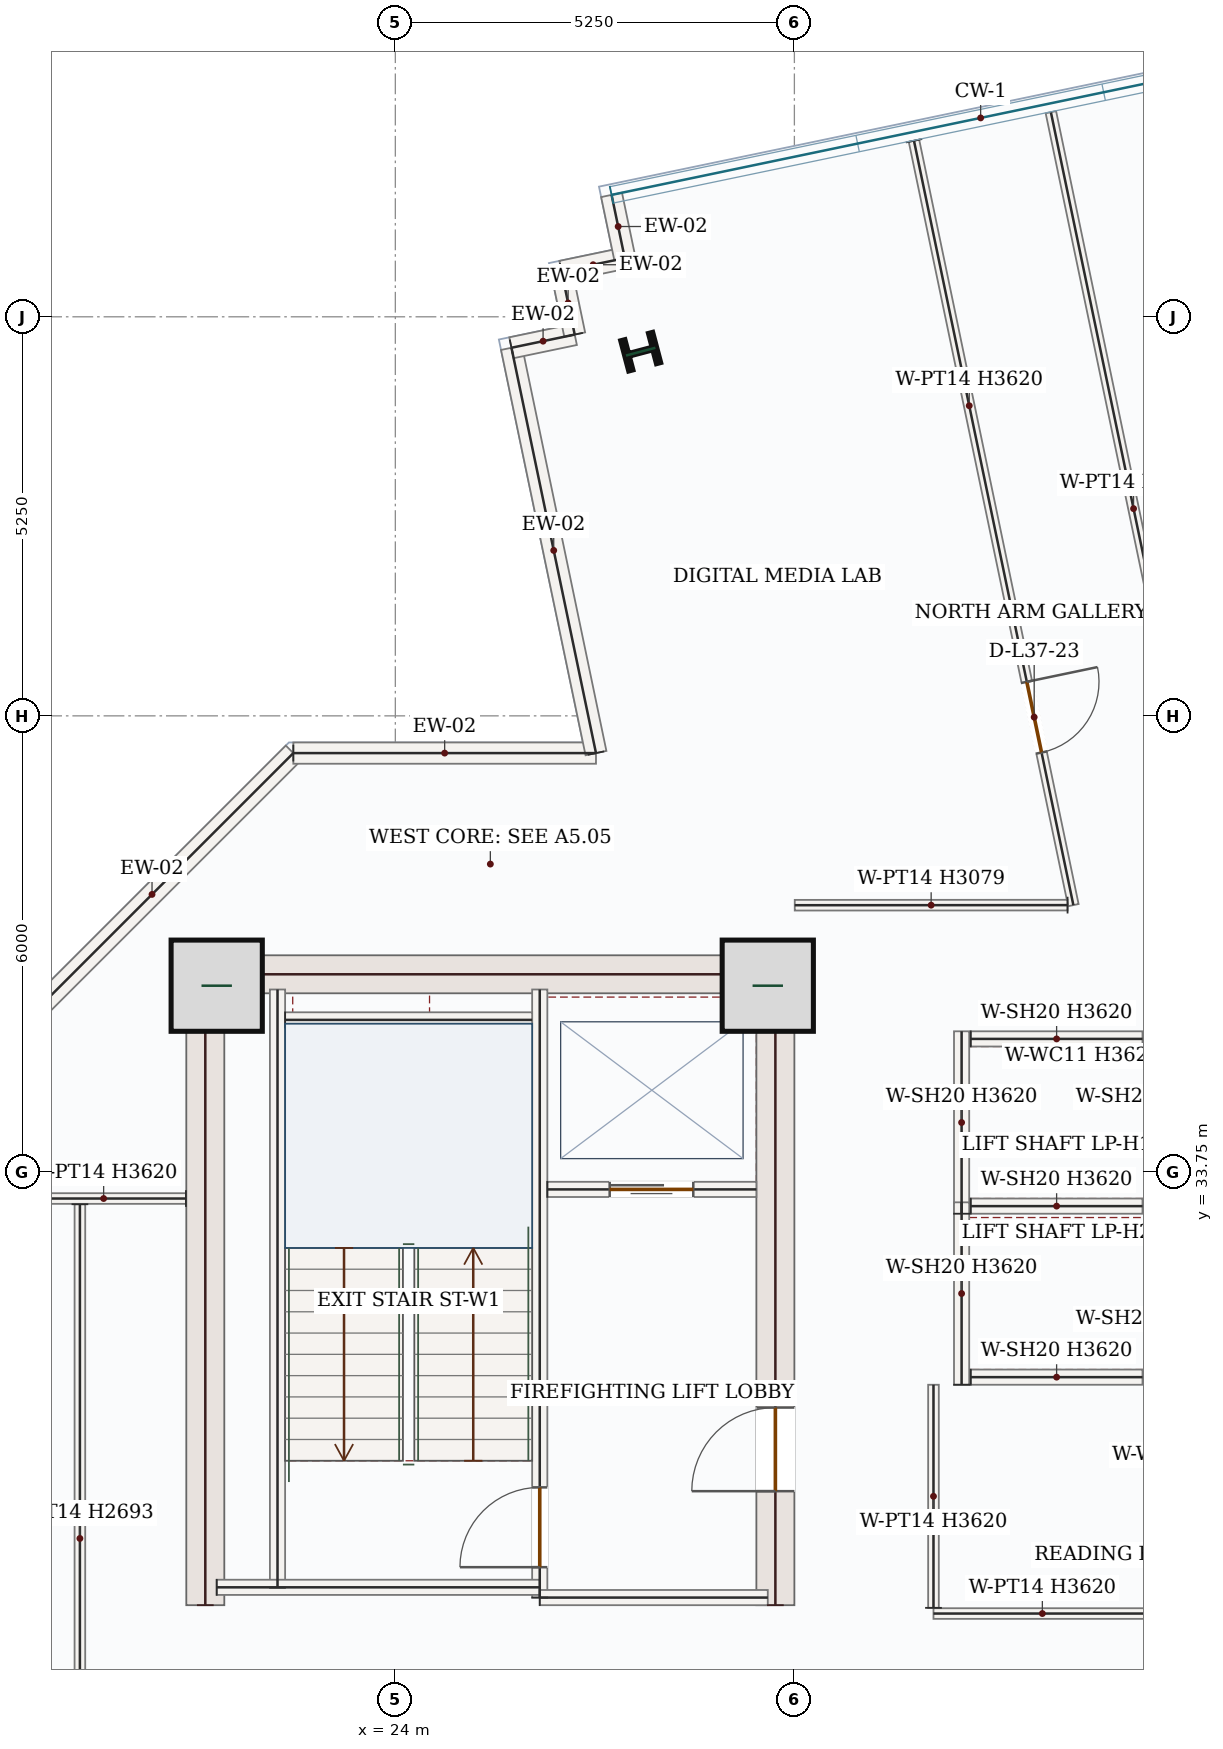
"""IFC4 building model, lengths in metres.
Left out: names, types, materials, properties, quantities, classifications, styles, units other than length and angle.
Written with IfcOpenShell. Run it as: python <this file> out.ifc"""

import sys

from ifc_helpers import new_model, si_unit, direction, frame, frame_2d, origin, origin_2d, place, context, subcontext, project, spatial, rectangle, i_section, extrude, source, transform, mapped, element, fill, save


model = new_model("IFC4")
c1 = context("Model", 3, precision=1e-05, world=origin(), true_north=direction((0.0, 1.0)))
c2 = subcontext(c1, "Body", "Model", "MODEL_VIEW")
j1 = project(units=[si_unit("LENGTHUNIT", "METRE"), si_unit("PLANEANGLEUNIT", "RADIAN")], contexts=[c1])
p1 = place(None, origin())
s1 = spatial("IfcSite", under=j1, at=p1, CompositionType="ELEMENT")
p2 = place(p1, origin())
s2 = spatial("IfcBuilding", under=s1, at=p2, CompositionType="ELEMENT")
p3 = place(p2, frame((0.0, 0.0, 162.9)))
s3 = spatial("IfcBuildingStorey", under=s2, at=p3, CompositionType="ELEMENT", Elevation=162.9)
m1 = source(origin(), c2, "Body", "SweptSolid", [
    extrude(rectangle(XDim=8.55, YDim=0.5, at=frame_2d((4.275, 0.0))), origin(), (0.0, 0.0, 1.0), 3.62),
])
p4 = place(p3, frame((21.5, 28.05, 0.0), z_axis=(0.0, 0.0, 1.0), x_axis=(0.0, 1.0, 0.0)))
e1 = element("IfcWall", 1, at=p4, inside=s3, PredefinedType="SHEAR", context=c2, shape_type="MappedRepresentation", body=[
    mapped(m1, transform((0.0, 0.0, 0.0), x_axis=(1.0, 0.0, 0.0), y_axis=(0.0, 1.0, 0.0), z_axis=(0.0, 0.0, 1.0), scale=1.0)),
])
p5 = place(p3, frame((29.0, 28.05, 0.0), z_axis=(0.0, 0.0, 1.0), x_axis=(0.0, 1.0, 0.0)))
e2 = element("IfcWall", 2, at=p5, inside=s3, PredefinedType="SHEAR", context=c2, shape_type="SweptSolid", body=[
    extrude(rectangle(XDim=8.55, YDim=0.5, at=frame_2d((4.275, 0.0))), origin(), (0.0, 0.0, 1.0), 3.62),
])
p6 = place(p5, frame((1.5, 0.0, 0.0)))
e3 = element("IfcOpeningElement", 3, at=p6, cuts=e2, PredefinedType="OPENING", context=c2, shape_type="SweptSolid", body=[
    extrude(rectangle(XDim=1.1, YDim=2.2, at=frame_2d((0.55, 1.1))), frame((0.0, 0.26, 0.0), z_axis=(0.0, -1.0, 0.0), x_axis=(1.0, 0.0, 0.0)), (0.0, 0.0, 1.0), 0.52),
])
m2 = source(origin(), c2, "Body", "SweptSolid", [
    extrude(rectangle(XDim=7.0, YDim=0.5, at=frame_2d((3.5, 0.0))), origin(), (0.0, 0.0, 1.0), 3.62),
])
p7 = place(p3, frame((21.75, 36.35, 0.0), z_axis=(0.0, 0.0, 1.0), x_axis=(1.0, 0.0, 0.0)))
e4 = element("IfcWall", 4, at=p7, inside=s3, PredefinedType="SHEAR", context=c2, shape_type="MappedRepresentation", body=[
    mapped(m2, transform((0.0, 0.0, 0.0), x_axis=(1.0, 0.0, 0.0), y_axis=(0.0, 1.0, 0.0), z_axis=(0.0, 0.0, 1.0), scale=1.0)),
])
m3 = source(origin(), c2, "Body", "SweptSolid", [
    extrude(rectangle(XDim=1.2, YDim=1.2, at=origin_2d()), origin(), (0.0, 0.0, 1.0), 3.9),
])
for number, where, z_axis, x_axis in (
    (5, (21.65, 36.2, 0.0), (0.0, 0.0, 1.0), (1.0, 0.0, 0.0)),
    (6, (28.9, 36.2, 0.0), (0.0, 0.0, 1.0), (1.0, 0.0, 0.0)),
):
    element("IfcColumn", number, at=place(p3, frame(where, z_axis=z_axis, x_axis=x_axis)), inside=s3, PredefinedType="COLUMN", context=c2, shape_type="MappedRepresentation", body=[
        mapped(m3, transform((0.0, 0.0, 0.0), x_axis=(1.0, 0.0, 0.0), y_axis=(0.0, 1.0, 0.0), z_axis=(0.0, 0.0, 1.0), scale=1.0)),
    ])
m4 = source(origin(), c2, "Body", "SweptSolid", [
    extrude(i_section(OverallWidth=0.412, OverallDepth=0.435, WebThickness=0.036, FlangeThickness=0.057, FilletRadius=0.018, at=origin_2d()), origin(), (0.0, 0.0, 1.0), 3.9),
])
p8 = place(p3, frame((27.228, 44.541, 0.0), z_axis=(0.0, 0.0, 1.0), x_axis=(-0.255445757936, 0.966823388604, 0.0)))
e7 = element("IfcColumn", 7, at=p8, inside=s3, PredefinedType="COLUMN", context=c2, shape_type="MappedRepresentation", body=[
    mapped(m4, transform((0.0, 0.0, 0.0), x_axis=(1.0, 0.0, 0.0), y_axis=(0.0, 1.0, 0.0), z_axis=(0.0, 0.0, 1.0), scale=1.0)),
])
m5 = source(origin(), c2, "Body", "SweptSolid", [
    extrude(rectangle(XDim=5.258, YDim=0.28, at=frame_2d((2.629, 0.0))), origin(), (0.0, 0.0, 1.0), 3.62),
])
p9 = place(p3, frame((18.94, 35.542, 0.0), z_axis=(0.0, 0.0, 1.0), x_axis=(0.707106781187, 0.707106781187, 0.0)))
e8 = element("IfcWall", 8, at=p9, inside=s3, PredefinedType="SOLIDWALL", context=c2, shape_type="MappedRepresentation", body=[
    mapped(m5, transform((0.0, 0.0, 0.0), x_axis=(1.0, 0.0, 0.0), y_axis=(0.0, 1.0, 0.0), z_axis=(0.0, 0.0, 1.0), scale=1.0)),
])
m6 = source(origin(), c2, "Body", "SweptSolid", [
    extrude(rectangle(XDim=3.982, YDim=0.28, at=frame_2d((1.991, 0.0))), origin(), (0.0, 0.0, 1.0), 3.62),
])
p10 = place(p3, frame((22.658, 39.26, 0.0), z_axis=(0.0, 0.0, 1.0), x_axis=(1.0, 0.0, 0.0)))
e9 = element("IfcWall", 9, at=p10, inside=s3, PredefinedType="SOLIDWALL", context=c2, shape_type="MappedRepresentation", body=[
    mapped(m6, transform((0.0, 0.0, 0.0), x_axis=(1.0, 0.0, 0.0), y_axis=(0.0, 1.0, 0.0), z_axis=(0.0, 0.0, 1.0), scale=1.0)),
])
m7 = source(origin(), c2, "Body", "SweptSolid", [
    extrude(rectangle(XDim=5.447, YDim=0.28, at=frame_2d((2.724, 0.0))), origin(), (0.0, 0.0, 1.0), 3.62),
])
p11 = place(p3, frame((26.64, 39.26, 0.0), z_axis=(0.0, 0.0, 1.0), x_axis=(-0.204151126022, 0.978939384101, 0.0)))
e10 = element("IfcWall", 10, at=p11, inside=s3, PredefinedType="SOLIDWALL", context=c2, shape_type="MappedRepresentation", body=[
    mapped(m7, transform((0.0, 0.0, 0.0), x_axis=(1.0, 0.0, 0.0), y_axis=(0.0, 1.0, 0.0), z_axis=(0.0, 0.0, 1.0), scale=1.0)),
])
m8 = source(origin(), c2, "Body", "SweptSolid", [
    extrude(rectangle(XDim=0.85, YDim=0.28, at=frame_2d((0.425, 0.0))), origin(), (0.0, 0.0, 1.0), 3.62),
])
for number, where, z_axis, x_axis in (
    (11, (25.528, 44.593, 0.0), (0.0, 0.0, 1.0), (0.979, 0.204, 0.0)),
    (12, (26.36, 44.766, 0.0), (0.0, 0.0, 1.0), (-0.204, 0.979, 0.0)),
):
    element("IfcWall", number, at=place(p3, frame(where, z_axis=z_axis, x_axis=x_axis)), inside=s3, PredefinedType="SOLIDWALL", context=c2, shape_type="MappedRepresentation", body=[
        mapped(m8, transform((0.0, 0.0, 0.0), x_axis=(1.0, 0.0, 0.0), y_axis=(0.0, 1.0, 0.0), z_axis=(0.0, 0.0, 1.0), scale=1.0)),
    ])
m9 = source(origin(), c2, "Body", "SweptSolid", [
    extrude(rectangle(XDim=0.85, YDim=0.28, at=frame_2d((0.425, 0.0))), origin(), (0.0, 0.0, 1.0), 3.62),
])
p12 = place(p3, frame((26.186, 45.598, 0.0), z_axis=(0.0, 0.0, 1.0), x_axis=(0.97893500384, 0.204172128991, 0.0)))
e13 = element("IfcWall", 13, at=p12, inside=s3, PredefinedType="SOLIDWALL", context=c2, shape_type="MappedRepresentation", body=[
    mapped(m9, transform((0.0, 0.0, 0.0), x_axis=(1.0, 0.0, 0.0), y_axis=(0.0, 1.0, 0.0), z_axis=(0.0, 0.0, 1.0), scale=1.0)),
])
p13 = place(p3, frame((27.019, 45.772, 0.0), z_axis=(0.0, 0.0, 1.0), x_axis=(-0.20422954019, 0.978923028084, 0.0)))
e14 = element("IfcWall", 14, at=p13, inside=s3, PredefinedType="SOLIDWALL", context=c2, shape_type="MappedRepresentation", body=[
    mapped(m8, transform((0.0, 0.0, 0.0), x_axis=(1.0, 0.0, 0.0), y_axis=(0.0, 1.0, 0.0), z_axis=(0.0, 0.0, 1.0), scale=1.0)),
])
m10 = source(origin(), c2, "Body", "SweptSolid", [
    extrude(rectangle(XDim=7.87, YDim=0.2, at=frame_2d((3.935, 0.0))), origin(), (0.0, 0.0, 1.0), 3.62),
])
p14 = place(p3, frame((22.45, 28.28, 0.0), z_axis=(0.0, 0.0, 1.0), x_axis=(0.0, 1.0, 0.0)))
e15 = element("IfcWall", 15, at=p14, inside=s3, PredefinedType="SOLIDWALL", context=c2, shape_type="MappedRepresentation", body=[
    mapped(m10, transform((0.0, 0.0, 0.0), x_axis=(1.0, 0.0, 0.0), y_axis=(0.0, 1.0, 0.0), z_axis=(0.0, 0.0, 1.0), scale=1.0)),
])
p15 = place(p3, frame((25.9, 28.15, 0.0), z_axis=(0.0, 0.0, 1.0), x_axis=(0.0, 1.0, 0.0)))
e16 = element("IfcWall", 16, at=p15, inside=s3, PredefinedType="SOLIDWALL", context=c2, shape_type="SweptSolid", body=[
    extrude(rectangle(XDim=8.0, YDim=0.2, at=frame_2d((4.0, 0.0))), origin(), (0.0, 0.0, 1.0), 3.62),
])
p16 = place(p15, frame((0.4, 0.0, 0.0)))
e17 = element("IfcOpeningElement", 17, at=p16, cuts=e16, PredefinedType="OPENING", context=c2, shape_type="SweptSolid", body=[
    extrude(rectangle(XDim=1.05, YDim=2.15, at=frame_2d((0.525, 1.075))), frame((0.0, 0.11, 0.0), z_axis=(0.0, -1.0, 0.0), x_axis=(1.0, 0.0, 0.0)), (0.0, 0.0, 1.0), 0.22),
])
m11 = source(origin(), c2, "Body", "SweptSolid", [
    extrude(rectangle(XDim=4.25, YDim=0.2, at=frame_2d((2.125, 0.0))), origin(), (0.0, 0.0, 1.0), 3.62),
])
p17 = place(p3, frame((21.65, 28.285, 0.0), z_axis=(0.0, 0.0, 1.0), x_axis=(1.0, 0.0, 0.0)))
e18 = element("IfcWall", 18, at=p17, inside=s3, PredefinedType="SOLIDWALL", context=c2, shape_type="MappedRepresentation", body=[
    mapped(m11, transform((0.0, 0.0, 0.0), x_axis=(1.0, 0.0, 0.0), y_axis=(0.0, 1.0, 0.0), z_axis=(0.0, 0.0, 1.0), scale=1.0)),
])
m12 = source(origin(), c2, "Body", "SweptSolid", [
    extrude(rectangle(XDim=3.0, YDim=0.2, at=frame_2d((1.5, 0.0))), origin(), (0.0, 0.0, 1.0), 3.62),
])
p18 = place(p3, frame((25.9, 28.15, 0.0), z_axis=(0.0, 0.0, 1.0), x_axis=(1.0, 0.0, 0.0)))
e19 = element("IfcWall", 19, at=p18, inside=s3, PredefinedType="SOLIDWALL", context=c2, shape_type="MappedRepresentation", body=[
    mapped(m12, transform((0.0, 0.0, 0.0), x_axis=(1.0, 0.0, 0.0), y_axis=(0.0, 1.0, 0.0), z_axis=(0.0, 0.0, 1.0), scale=1.0)),
])
m13 = source(origin(), c2, "Body", "SweptSolid", [
    extrude(rectangle(XDim=3.25, YDim=0.2, at=frame_2d((1.625, 0.0))), origin(), (0.0, 0.0, 1.0), 3.62),
])
p19 = place(p3, frame((22.55, 35.75, 0.0), z_axis=(0.0, 0.0, 1.0), x_axis=(1.0, 0.0, 0.0)))
e20 = element("IfcWall", 20, at=p19, inside=s3, PredefinedType="SOLIDWALL", context=c2, shape_type="MappedRepresentation", body=[
    mapped(m13, transform((0.0, 0.0, 0.0), x_axis=(1.0, 0.0, 0.0), y_axis=(0.0, 1.0, 0.0), z_axis=(0.0, 0.0, 1.0), scale=1.0)),
])
p20 = place(p3, frame((26.0, 33.52, 0.0), z_axis=(0.0, 0.0, 1.0), x_axis=(1.0, 0.0, 0.0)))
e21 = element("IfcWall", 21, at=p20, inside=s3, PredefinedType="SOLIDWALL", context=c2, shape_type="SweptSolid", body=[
    extrude(rectangle(XDim=2.75, YDim=0.2, at=frame_2d((1.375, 0.0))), origin(), (0.0, 0.0, 1.0), 3.62),
])
p21 = place(p20, frame((0.82, 0.0, 0.0)))
e22 = element("IfcOpeningElement", 22, at=p21, cuts=e21, PredefinedType="OPENING", context=c2, shape_type="SweptSolid", body=[
    extrude(rectangle(XDim=1.1, YDim=2.15, at=frame_2d((0.55, 1.075))), frame((0.0, 0.11, 0.0), z_axis=(0.0, -1.0, 0.0), x_axis=(1.0, 0.0, 0.0)), (0.0, 0.0, 1.0), 0.22),
])
m14 = source(origin(), c2, "Body", "SweptSolid", [
    extrude(rectangle(XDim=2.4, YDim=0.2, at=frame_2d((1.2, 0.0))), origin(), (0.0, 0.0, 1.0), 3.62),
])
p22 = place(p3, frame((31.45, 33.2, 0.0), z_axis=(0.0, 0.0, 1.0), x_axis=(0.0, 1.0, 0.0)))
e23 = element("IfcWall", 23, at=p22, inside=s3, PredefinedType="SOLIDWALL", context=c2, shape_type="MappedRepresentation", body=[
    mapped(m14, transform((0.0, 0.0, 0.0), x_axis=(1.0, 0.0, 0.0), y_axis=(0.0, 1.0, 0.0), z_axis=(0.0, 0.0, 1.0), scale=1.0)),
])
m15 = source(origin(), c2, "Body", "SweptSolid", [
    extrude(rectangle(XDim=2.26, YDim=0.2, at=frame_2d((1.13, 0.0))), origin(), (0.0, 0.0, 1.0), 3.62),
])
for number, where, z_axis, x_axis in (
    (24, (31.57, 33.3, 0.0), (0.0, 0.0, 1.0), (1.0, 0.0, 0.0)),
    (25, (31.57, 35.5, 0.0), (0.0, 0.0, 1.0), (1.0, 0.0, 0.0)),
):
    element("IfcWall", number, at=place(p3, frame(where, z_axis=z_axis, x_axis=x_axis)), inside=s3, PredefinedType="SOLIDWALL", context=c2, shape_type="MappedRepresentation", body=[
        mapped(m15, transform((0.0, 0.0, 0.0), x_axis=(1.0, 0.0, 0.0), y_axis=(0.0, 1.0, 0.0), z_axis=(0.0, 0.0, 1.0), scale=1.0)),
    ])
p23 = place(p3, frame((31.45, 30.95, 0.0), z_axis=(0.0, 0.0, 1.0), x_axis=(0.0, 1.0, 0.0)))
e26 = element("IfcWall", 26, at=p23, inside=s3, PredefinedType="SOLIDWALL", context=c2, shape_type="MappedRepresentation", body=[
    mapped(m14, transform((0.0, 0.0, 0.0), x_axis=(1.0, 0.0, 0.0), y_axis=(0.0, 1.0, 0.0), z_axis=(0.0, 0.0, 1.0), scale=1.0)),
])
p24 = place(p3, frame((31.57, 31.05, 0.0), z_axis=(0.0, 0.0, 1.0), x_axis=(1.0, 0.0, 0.0)))
e27 = element("IfcWall", 27, at=p24, inside=s3, PredefinedType="SOLIDWALL", context=c2, shape_type="MappedRepresentation", body=[
    mapped(m15, transform((0.0, 0.0, 0.0), x_axis=(1.0, 0.0, 0.0), y_axis=(0.0, 1.0, 0.0), z_axis=(0.0, 0.0, 1.0), scale=1.0)),
])
p25 = place(p3, frame((35.895, 27.94, 0.0), z_axis=(0.0, 0.0, 1.0), x_axis=(-1.0, 0.0, 0.0)))
e28 = element("IfcWall", 28, at=p25, inside=s3, PredefinedType="PARTITIONING", context=c2, shape_type="SweptSolid", body=[
    extrude(rectangle(XDim=4.815, YDim=0.14, at=frame_2d((2.407, 0.0))), origin(), (0.0, 0.0, 1.0), 3.62),
])
p26 = place(p25, frame((0.85, 0.0, 0.0)))
e29 = element("IfcOpeningElement", 29, at=p26, cuts=e28, PredefinedType="OPENING", context=c2, shape_type="SweptSolid", body=[
    extrude(rectangle(XDim=0.95, YDim=2.15, at=frame_2d((0.475, 1.075))), frame((0.0, 0.08, 0.0), z_axis=(0.0, -1.0, 0.0), x_axis=(1.0, 0.0, 0.0)), (0.0, 0.0, 1.0), 0.16),
])
m16 = source(origin(), c2, "Body", "SweptSolid", [
    extrude(rectangle(XDim=2.935, YDim=0.14, at=frame_2d((1.468, 0.0))), origin(), (0.0, 0.0, 1.0), 3.62),
])
p27 = place(p3, frame((31.08, 28.015, 0.0), z_axis=(0.0, 0.0, 1.0), x_axis=(0.0, 1.0, 0.0)))
e30 = element("IfcWall", 30, at=p27, inside=s3, PredefinedType="PARTITIONING", context=c2, shape_type="MappedRepresentation", body=[
    mapped(m16, transform((0.0, 0.0, 0.0), x_axis=(1.0, 0.0, 0.0), y_axis=(0.0, 1.0, 0.0), z_axis=(0.0, 0.0, 1.0), scale=1.0)),
])
m17 = source(origin(), c2, "Body", "SweptSolid", [
    extrude(rectangle(XDim=10.656, YDim=0.14, at=frame_2d((5.328, 0.0))), origin(), (0.0, 0.0, 1.0), 3.62),
])
p28 = place(p3, frame((34.8, 37.26, 0.0), z_axis=(0.0, 0.0, 1.0), x_axis=(-0.204159189901, 0.978937702399, 0.0)))
e31 = element("IfcWall", 31, at=p28, inside=s3, PredefinedType="PARTITIONING", context=c2, shape_type="MappedRepresentation", body=[
    mapped(m17, transform((0.0, 0.0, 0.0), x_axis=(1.0, 0.0, 0.0), y_axis=(0.0, 1.0, 0.0), z_axis=(0.0, 0.0, 1.0), scale=1.0)),
])
p29 = place(p3, frame((30.823, 47.316, 0.0), z_axis=(0.0, 0.0, 1.0), x_axis=(0.204130779611, -0.978943626985, 0.0)))
e32 = element("IfcWall", 32, at=p29, inside=s3, PredefinedType="PARTITIONING", context=c2, shape_type="SweptSolid", body=[
    extrude(rectangle(XDim=10.272, YDim=0.14, at=frame_2d((5.136, 0.0))), origin(), (0.0, 0.0, 1.0), 3.62),
])
p30 = place(p29, frame((7.271, 0.0, 0.0)))
e33 = element("IfcOpeningElement", 33, at=p30, cuts=e32, PredefinedType="OPENING", context=c2, shape_type="SweptSolid", body=[
    extrude(rectangle(XDim=0.95, YDim=2.15, at=frame_2d((0.475, 1.075))), frame((0.0, 0.08, 0.0), z_axis=(0.0, -1.0, 0.0), x_axis=(1.0, 0.0, 0.0)), (0.0, 0.0, 1.0), 0.16),
])
m18 = source(origin(), c2, "Body", "SweptSolid", [
    extrude(rectangle(XDim=3.589, YDim=0.14, at=frame_2d((1.794, 0.0))), origin(), (0.0, 0.0, 1.0), 3.079),
])
p31 = place(p3, frame((32.844, 37.26, 0.0), z_axis=(0.0, 0.0, 1.0), x_axis=(-0.999999942162, -0.000340112898, 0.0)))
e34 = element("IfcWall", 34, at=p31, inside=s3, PredefinedType="PARTITIONING", context=c2, shape_type="MappedRepresentation", body=[
    mapped(m18, transform((0.0, 0.0, 0.0), x_axis=(1.0, 0.0, 0.0), y_axis=(0.0, 1.0, 0.0), z_axis=(0.0, 0.0, 1.0), scale=1.0)),
])
m19 = source(origin(), c2, "Body", "SweptSolid", [
    extrude(rectangle(XDim=2.165, YDim=0.14, at=frame_2d((1.083, 0.0))), origin(), (0.0, 0.0, 1.0), 3.62),
])
p32 = place(p3, frame((21.245, 33.4, 0.0), z_axis=(0.0, 0.0, 1.0), x_axis=(-1.0, 0.0, 0.0)))
e35 = element("IfcWall", 35, at=p32, inside=s3, PredefinedType="PARTITIONING", context=c2, shape_type="MappedRepresentation", body=[
    mapped(m19, transform((0.0, 0.0, 0.0), x_axis=(1.0, 0.0, 0.0), y_axis=(0.0, 1.0, 0.0), z_axis=(0.0, 0.0, 1.0), scale=1.0)),
])
m20 = source(origin(), c2, "Body", "SweptSolid", [
    extrude(rectangle(XDim=8.794, YDim=0.14, at=frame_2d((4.397, 0.0))), origin(), (0.0, 0.0, 1.0), 2.693),
])
p33 = place(p3, frame((19.85, 33.325, 0.0), z_axis=(0.0, 0.0, 1.0), x_axis=(-2.7762354e-05, -0.999999999615, 0.0)))
e36 = element("IfcWall", 36, at=p33, inside=s3, PredefinedType="PARTITIONING", context=c2, shape_type="MappedRepresentation", body=[
    mapped(m20, transform((0.0, 0.0, 0.0), x_axis=(1.0, 0.0, 0.0), y_axis=(0.0, 1.0, 0.0), z_axis=(0.0, 0.0, 1.0), scale=1.0)),
])
m21 = source(origin(), c2, "Body", "SweptSolid", [
    extrude(rectangle(XDim=1.05, YDim=2.15, at=frame_2d((0.525, 1.075))), frame((0.0, 0.025, 0.0), z_axis=(0.0, -1.0, 0.0), x_axis=(1.0, 0.0, 0.0)), (0.0, 0.0, 1.0), 0.05),
])
p34 = place(p16, origin())
e37 = element("IfcDoor", 37, at=p34, inside=s3, OperationType="SINGLE_SWING_LEFT", PredefinedType="DOOR", context=c2, shape_type="MappedRepresentation", body=[
    mapped(m21, transform((0.0, 0.0, 0.0), x_axis=(1.0, 0.0, 0.0), y_axis=(0.0, 1.0, 0.0), z_axis=(0.0, 0.0, 1.0), scale=1.0)),
])
fill(e17, e37)
m22 = source(origin(), c2, "Body", "SweptSolid", [
    extrude(rectangle(XDim=1.1, YDim=2.15, at=frame_2d((0.55, 1.075))), frame((0.0, 0.025, 0.0), z_axis=(0.0, -1.0, 0.0), x_axis=(1.0, 0.0, 0.0)), (0.0, 0.0, 1.0), 0.05),
])
p35 = place(p21, origin())
e38 = element("IfcDoor", 38, at=p35, inside=s3, OperationType="DOUBLE_DOOR_SLIDING", PredefinedType="DOOR", context=c2, shape_type="MappedRepresentation", body=[
    mapped(m22, transform((0.0, 0.0, 0.0), x_axis=(1.0, 0.0, 0.0), y_axis=(0.0, 1.0, 0.0), z_axis=(0.0, 0.0, 1.0), scale=1.0)),
])
fill(e22, e38)
m23 = source(origin(), c2, "Body", "SweptSolid", [
    extrude(rectangle(XDim=1.1, YDim=2.2, at=frame_2d((0.55, 1.1))), frame((0.0, 0.025, 0.0), z_axis=(0.0, -1.0, 0.0), x_axis=(1.0, 0.0, 0.0)), (0.0, 0.0, 1.0), 0.05),
])
p36 = place(p6, origin())
e39 = element("IfcDoor", 39, at=p36, inside=s3, OperationType="SINGLE_SWING_LEFT", PredefinedType="DOOR", context=c2, shape_type="MappedRepresentation", body=[
    mapped(m23, transform((0.0, 0.0, 0.0), x_axis=(1.0, 0.0, 0.0), y_axis=(0.0, 1.0, 0.0), z_axis=(0.0, 0.0, 1.0), scale=1.0)),
])
fill(e3, e39)
m24 = source(origin(), c2, "Body", "SweptSolid", [
    extrude(rectangle(XDim=0.95, YDim=2.15, at=frame_2d((0.475, 1.075))), frame((0.0, 0.025, 0.0), z_axis=(0.0, -1.0, 0.0), x_axis=(1.0, 0.0, 0.0)), (0.0, 0.0, 1.0), 0.05),
])
p37 = place(p30, origin())
e40 = element("IfcDoor", 40, at=p37, inside=s3, OperationType="SINGLE_SWING_LEFT", PredefinedType="DOOR", context=c2, shape_type="MappedRepresentation", body=[
    mapped(m24, transform((0.0, 0.0, 0.0), x_axis=(1.0, 0.0, 0.0), y_axis=(0.0, 1.0, 0.0), z_axis=(0.0, 0.0, 1.0), scale=1.0)),
])
fill(e33, e40)
save(model, sys.argv[1])
